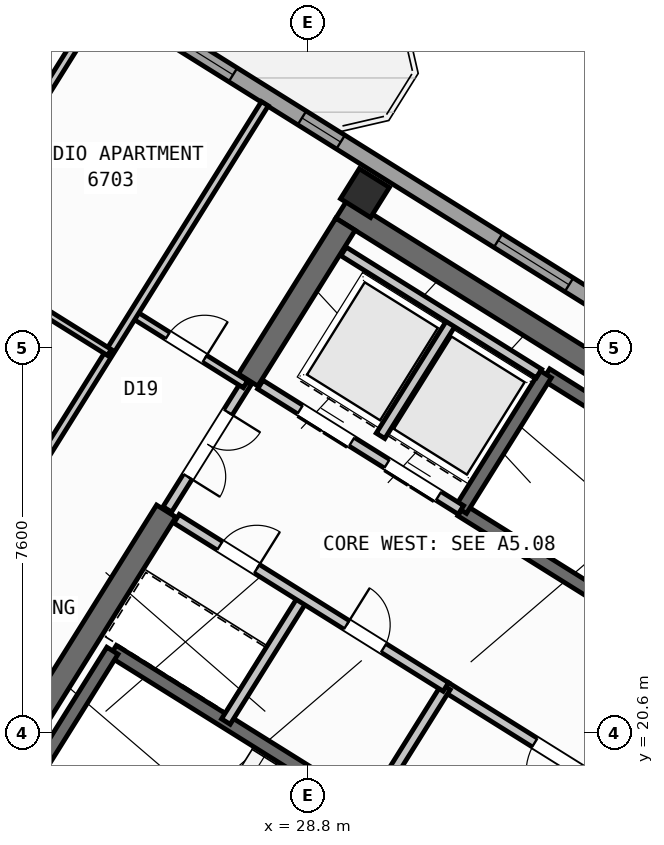
"""IFC4 building model, lengths in metres.
Left out: names, types, materials, properties, quantities, classifications, styles, units other than length and angle.
Written with IfcOpenShell. Run it as: python <this file> out.ifc"""

import sys

from ifc_helpers import new_model, si_unit, direction, frame, frame_2d, origin, origin_2d, place, context, subcontext, project, spatial, rectangle, hollow_rectangle, extrude, source, transform, mapped, element, fill, save


model = new_model("IFC4")
c1 = context("Model", 3, precision=1e-05, world=origin(), true_north=direction((0.0, 1.0)))
c2 = subcontext(c1, "Body", "Model", "MODEL_VIEW")
j1 = project(units=[si_unit("LENGTHUNIT", "METRE"), si_unit("PLANEANGLEUNIT", "RADIAN")], contexts=[c1])
p1 = place(None, origin())
s1 = spatial("IfcSite", under=j1, at=p1, CompositionType="ELEMENT")
p2 = place(p1, origin())
s2 = spatial("IfcBuilding", under=s1, at=p2, CompositionType="ELEMENT")
p3 = place(p2, frame((0.0, 0.0, 266.4)))
s3 = spatial("IfcBuildingStorey", under=s2, at=p3, CompositionType="ELEMENT", Elevation=266.4)
p4 = place(p3, frame((40.531, 24.036, 0.0), z_axis=(0.0, 0.0, 1.0), x_axis=(-0.848048787466, 0.529918157905, 0.0)))
e1 = element("IfcWall", 1, at=p4, inside=s3, PredefinedType="SHEAR", context=c2, shape_type="SweptSolid", body=[
    extrude(rectangle(XDim=13.04, YDim=0.45, at=frame_2d((6.52, 0.0))), origin(), (0.0, 0.0, 1.0), 3.35),
])
p5 = place(p3, frame((29.544, 30.636, 0.0), z_axis=(0.0, 0.0, 1.0), x_axis=(-0.529902075036, -0.848058836916, 0.0)))
e2 = element("IfcWall", 2, at=p5, inside=s3, PredefinedType="SHEAR", context=c2, shape_type="SweptSolid", body=[
    extrude(rectangle(XDim=3.625, YDim=0.45, at=frame_2d((1.812, 0.0))), origin(), (0.0, 0.0, 1.0), 3.35),
])
p6 = place(p3, frame((26.007, 24.976, 0.0), z_axis=(0.0, 0.0, 1.0), x_axis=(-0.529931155655, -0.848040665456, 0.0)))
e3 = element("IfcWall", 3, at=p6, inside=s3, PredefinedType="SHEAR", context=c2, shape_type="SweptSolid", body=[
    extrude(rectangle(XDim=6.475, YDim=0.45, at=frame_2d((3.238, 0.0))), origin(), (0.0, 0.0, 1.0), 3.35),
])
m1 = source(origin(), c2, "Body", "SweptSolid", [
    extrude(hollow_rectangle(XDim=0.7, YDim=0.7, WallThickness=0.028, at=origin_2d()), origin(), (0.0, 0.0, 1.0), 3.6),
])
p7 = place(p3, frame((29.928, 31.251, 0.0), z_axis=(0.0, 0.0, 1.0), x_axis=(-0.848048096156, 0.529919264233, 0.0)))
e4 = element("IfcColumn", 4, at=p7, inside=s3, PredefinedType="COLUMN", context=c2, shape_type="MappedRepresentation", body=[
    mapped(m1, transform((0.0, 0.0, 0.0), scale=1.0)),
])
p8 = place(p3, frame((29.268, 6.429, 0.0), z_axis=(0.0, 0.0, 1.0), x_axis=(-0.848049971435, 0.529916263149, 0.0)))
e5 = element("IfcWall", 5, at=p8, inside=s3, PredefinedType="STANDARD", context=c2, shape_type="SweptSolid", body=[
    extrude(rectangle(XDim=31.588, YDim=0.32, at=frame_2d((15.794, 0.0))), origin(), (0.0, 0.0, 1.0), 3.35),
])
p9 = place(p8, frame((16.362, 0.0, 0.0)))
e6 = element("IfcOpeningElement", 6, at=p9, cuts=e5, PredefinedType="OPENING", context=c2, shape_type="SweptSolid", body=[
    extrude(rectangle(XDim=1.2, YDim=2.15, at=frame_2d((0.6, 1.075))), frame((0.0, 0.17, 0.0), z_axis=(0.0, -1.0, 0.0), x_axis=(1.0, 0.0, 0.0)), (0.0, 0.0, 1.0), 0.34),
])
p10 = place(p8, frame((3.859, 0.0, 0.9)))
e7 = element("IfcOpeningElement", 7, at=p10, cuts=e5, PredefinedType="OPENING", context=c2, shape_type="SweptSolid", body=[
    extrude(rectangle(XDim=1.65, YDim=1.45, at=frame_2d((0.825, 0.725))), frame((0.0, 0.17, 0.0), z_axis=(0.0, -1.0, 0.0), x_axis=(1.0, 0.0, 0.0)), (0.0, 0.0, 1.0), 0.34),
])
p11 = place(p8, frame((10.519, 0.0, 0.9)))
e8 = element("IfcOpeningElement", 8, at=p11, cuts=e5, PredefinedType="OPENING", context=c2, shape_type="SweptSolid", body=[
    extrude(rectangle(XDim=1.65, YDim=1.45, at=frame_2d((0.825, 0.725))), frame((0.0, 0.17, 0.0), z_axis=(0.0, -1.0, 0.0), x_axis=(1.0, 0.0, 0.0)), (0.0, 0.0, 1.0), 0.34),
])
p12 = place(p8, frame((21.219, 0.0, 0.95)))
e9 = element("IfcOpeningElement", 9, at=p12, cuts=e5, PredefinedType="OPENING", context=c2, shape_type="SweptSolid", body=[
    extrude(rectangle(XDim=1.95, YDim=1.35, at=frame_2d((0.975, 0.675))), frame((0.0, 0.17, 0.0), z_axis=(0.0, -1.0, 0.0), x_axis=(1.0, 0.0, 0.0)), (0.0, 0.0, 1.0), 0.34),
])
p13 = place(p8, frame((26.406, 0.0, 1.0)))
e10 = element("IfcOpeningElement", 10, at=p13, cuts=e5, PredefinedType="OPENING", context=c2, shape_type="SweptSolid", body=[
    extrude(rectangle(XDim=0.9, YDim=1.25, at=frame_2d((0.45, 0.625))), frame((0.0, 0.17, 0.0), z_axis=(0.0, -1.0, 0.0), x_axis=(1.0, 0.0, 0.0)), (0.0, 0.0, 1.0), 0.34),
])
p14 = place(p8, frame((29.143, 0.0, 0.9)))
e11 = element("IfcOpeningElement", 11, at=p14, cuts=e5, PredefinedType="OPENING", context=c2, shape_type="SweptSolid", body=[
    extrude(rectangle(XDim=1.65, YDim=1.45, at=frame_2d((0.825, 0.725))), frame((0.0, 0.17, 0.0), z_axis=(0.0, -1.0, 0.0), x_axis=(1.0, 0.0, 0.0)), (0.0, 0.0, 1.0), 0.34),
])
p15 = place(p3, frame((14.138, 41.825, 0.0), z_axis=(0.0, 0.0, 1.0), x_axis=(0.848046498049, -0.529921821731, 0.0)))
e12 = element("IfcWall", 12, at=p15, inside=s3, PredefinedType="STANDARD", context=c2, shape_type="SweptSolid", body=[
    extrude(rectangle(XDim=31.588, YDim=0.32, at=frame_2d((15.794, 0.0))), origin(), (0.0, 0.0, 1.0), 3.35),
])
p16 = place(p15, frame((3.46, 0.0, 0.0)))
e13 = element("IfcOpeningElement", 13, at=p16, cuts=e12, PredefinedType="OPENING", context=c2, shape_type="SweptSolid", body=[
    extrude(rectangle(XDim=1.05, YDim=2.15, at=frame_2d((0.525, 1.075))), frame((0.0, 0.17, 0.0), z_axis=(0.0, -1.0, 0.0), x_axis=(1.0, 0.0, 0.0)), (0.0, 0.0, 1.0), 0.34),
])
p17 = place(p15, frame((0.831, 0.0, 1.0)))
e14 = element("IfcOpeningElement", 14, at=p17, cuts=e12, PredefinedType="OPENING", context=c2, shape_type="SweptSolid", body=[
    extrude(rectangle(XDim=0.9, YDim=1.25, at=frame_2d((0.45, 0.625))), frame((0.0, 0.17, 0.0), z_axis=(0.0, -1.0, 0.0), x_axis=(1.0, 0.0, 0.0)), (0.0, 0.0, 1.0), 0.34),
])
p18 = place(p15, frame((8.719, 0.0, 0.9)))
e15 = element("IfcOpeningElement", 15, at=p18, cuts=e12, PredefinedType="OPENING", context=c2, shape_type="SweptSolid", body=[
    extrude(rectangle(XDim=1.35, YDim=1.45, at=frame_2d((0.675, 0.725))), frame((0.0, 0.17, 0.0), z_axis=(0.0, -1.0, 0.0), x_axis=(1.0, 0.0, 0.0)), (0.0, 0.0, 1.0), 0.34),
])
p19 = place(p15, frame((13.599, 0.0, 0.95)))
e16 = element("IfcOpeningElement", 16, at=p19, cuts=e12, PredefinedType="OPENING", context=c2, shape_type="SweptSolid", body=[
    extrude(rectangle(XDim=1.95, YDim=1.35, at=frame_2d((0.975, 0.675))), frame((0.0, 0.17, 0.0), z_axis=(0.0, -1.0, 0.0), x_axis=(1.0, 0.0, 0.0)), (0.0, 0.0, 1.0), 0.34),
])
p20 = place(p15, frame((17.154, 0.0, 1.0)))
e17 = element("IfcOpeningElement", 17, at=p20, cuts=e12, PredefinedType="OPENING", context=c2, shape_type="SweptSolid", body=[
    extrude(rectangle(XDim=0.9, YDim=1.25, at=frame_2d((0.45, 0.625))), frame((0.0, 0.17, 0.0), z_axis=(0.0, -1.0, 0.0), x_axis=(1.0, 0.0, 0.0)), (0.0, 0.0, 1.0), 0.34),
])
p21 = place(p15, frame((21.719, 0.0, 0.9)))
e18 = element("IfcOpeningElement", 18, at=p21, cuts=e12, PredefinedType="OPENING", context=c2, shape_type="SweptSolid", body=[
    extrude(rectangle(XDim=1.65, YDim=1.45, at=frame_2d((0.825, 0.725))), frame((0.0, 0.17, 0.0), z_axis=(0.0, -1.0, 0.0), x_axis=(1.0, 0.0, 0.0)), (0.0, 0.0, 1.0), 0.34),
])
p22 = place(p15, frame((27.419, 0.0, 0.9)))
e19 = element("IfcOpeningElement", 19, at=p22, cuts=e12, PredefinedType="OPENING", context=c2, shape_type="SweptSolid", body=[
    extrude(rectangle(XDim=1.65, YDim=1.45, at=frame_2d((0.825, 0.725))), frame((0.0, 0.17, 0.0), z_axis=(0.0, -1.0, 0.0), x_axis=(1.0, 0.0, 0.0)), (0.0, 0.0, 1.0), 0.34),
])
p23 = place(p3, frame((31.28, 18.261, 0.0), z_axis=(0.0, 0.0, 1.0), x_axis=(-0.848051618787, 0.529913626805, 0.0)))
e20 = element("IfcWall", 20, at=p23, inside=s3, PredefinedType="SHEAR", context=c2, shape_type="SweptSolid", body=[
    extrude(rectangle(XDim=7.46, YDim=0.26, at=frame_2d((3.73, 0.0))), origin(), (0.0, 0.0, 1.0), 3.35),
])
p24 = place(p23, frame((0.36, 0.0, 0.0)))
e21 = element("IfcOpeningElement", 21, at=p24, cuts=e20, PredefinedType="OPENING", context=c2, shape_type="SweptSolid", body=[
    extrude(rectangle(XDim=0.86, YDim=2.05, at=frame_2d((0.43, 1.025))), frame((0.0, 0.14, 0.0), z_axis=(0.0, -1.0, 0.0), x_axis=(1.0, 0.0, 0.0)), (0.0, 0.0, 1.0), 0.28),
])
p25 = place(p3, frame((24.945, 22.22, 0.0), z_axis=(0.0, 0.0, 1.0), x_axis=(-0.529908658664, -0.84805472316, 0.0)))
e22 = element("IfcWall", 22, at=p25, inside=s3, PredefinedType="SHEAR", context=c2, shape_type="SweptSolid", body=[
    extrude(rectangle(XDim=3.16, YDim=0.26, at=frame_2d((1.58, 0.0))), origin(), (0.0, 0.0, 1.0), 3.35),
])
p26 = place(p3, frame((39.721, 23.788, 0.0), z_axis=(0.0, 0.0, 1.0), x_axis=(-0.848054434086, 0.529909121291, 0.0)))
e23 = element("IfcWall", 23, at=p26, inside=s3, PredefinedType="SHEAR", context=c2, shape_type="SweptSolid", body=[
    extrude(rectangle(XDim=7.33, YDim=0.26, at=frame_2d((3.665, 0.0))), origin(), (0.0, 0.0, 1.0), 3.35),
])
p27 = place(p3, frame((38.046, 21.108, 0.0), z_axis=(0.0, 0.0, 1.0), x_axis=(-0.848054434086, 0.529909121291, 0.0)))
e24 = element("IfcWall", 24, at=p27, inside=s3, PredefinedType="SHEAR", context=c2, shape_type="SweptSolid", body=[
    extrude(rectangle(XDim=7.33, YDim=0.26, at=frame_2d((3.665, 0.0))), origin(), (0.0, 0.0, 1.0), 3.35),
])
p28 = place(p27, frame((0.22, 0.0, 0.0)))
e25 = element("IfcOpeningElement", 25, at=p28, cuts=e24, PredefinedType="OPENING", context=c2, shape_type="SweptSolid", body=[
    extrude(rectangle(XDim=1.1, YDim=2.1, at=frame_2d((0.55, 1.05))), frame((0.0, 0.14, 0.0), z_axis=(0.0, -1.0, 0.0), x_axis=(1.0, 0.0, 0.0)), (0.0, 0.0, 1.0), 0.28),
])
p29 = place(p3, frame((33.496, 27.677, 0.0), z_axis=(0.0, 0.0, 1.0), x_axis=(-0.529908658664, -0.84805472316, 0.0)))
e26 = element("IfcWall", 26, at=p29, inside=s3, PredefinedType="SHEAR", context=c2, shape_type="SweptSolid", body=[
    extrude(rectangle(XDim=3.16, YDim=0.26, at=frame_2d((1.58, 0.0))), origin(), (0.0, 0.0, 1.0), 3.35),
])
p30 = place(p3, frame((36.459, 18.421, 0.0), z_axis=(0.0, 0.0, 1.0), x_axis=(-0.848059591691, 0.529900867089, 0.0)))
e27 = element("IfcWall", 27, at=p30, inside=s3, PredefinedType="STANDARD", context=c2, shape_type="SweptSolid", body=[
    extrude(rectangle(XDim=5.818, YDim=0.2, at=frame_2d((2.909, 0.0))), origin(), (0.0, 0.0, 1.0), 3.34),
])
p31 = place(p30, frame((2.598, 0.0, 0.0)))
e28 = element("IfcOpeningElement", 28, at=p31, cuts=e27, PredefinedType="OPENING", context=c2, shape_type="SweptSolid", body=[
    extrude(rectangle(XDim=1.15, YDim=2.1, at=frame_2d((0.575, 1.05))), frame((0.0, 0.11, 0.0), z_axis=(0.0, -1.0, 0.0), x_axis=(1.0, 0.0, 0.0)), (0.0, 0.0, 1.0), 0.22),
])
p32 = place(p3, frame((31.822, 24.998, 0.0), z_axis=(0.0, 0.0, 1.0), x_axis=(-0.848054125777, 0.529909614701, 0.0)))
e29 = element("IfcWall", 29, at=p32, inside=s3, PredefinedType="STANDARD", context=c2, shape_type="SweptSolid", body=[
    extrude(rectangle(XDim=4.668, YDim=0.2, at=frame_2d((2.334, 0.0))), origin(), (0.0, 0.0, 1.0), 3.34),
])
p33 = place(p32, frame((0.52, 0.0, 0.0)))
e30 = element("IfcOpeningElement", 30, at=p33, cuts=e29, PredefinedType="OPENING", context=c2, shape_type="SweptSolid", body=[
    extrude(rectangle(XDim=1.2, YDim=2.15, at=frame_2d((0.6, 1.075))), frame((0.0, 0.11, 0.0), z_axis=(0.0, -1.0, 0.0), x_axis=(1.0, 0.0, 0.0)), (0.0, 0.0, 1.0), 0.22),
])
p34 = place(p32, frame((2.54, 0.0, 0.0)))
e31 = element("IfcOpeningElement", 31, at=p34, cuts=e29, PredefinedType="OPENING", context=c2, shape_type="SweptSolid", body=[
    extrude(rectangle(XDim=1.2, YDim=2.15, at=frame_2d((0.6, 1.075))), frame((0.0, 0.11, 0.0), z_axis=(0.0, -1.0, 0.0), x_axis=(1.0, 0.0, 0.0)), (0.0, 0.0, 1.0), 0.22),
])
p35 = place(p3, frame((31.645, 28.716, 0.0), z_axis=(0.0, 0.0, 1.0), x_axis=(-0.52986693015, -0.848080795876, 0.0)))
e32 = element("IfcWall", 32, at=p35, inside=s3, PredefinedType="STANDARD", context=c2, shape_type="SweptSolid", body=[
    extrude(rectangle(XDim=2.66, YDim=0.2, at=frame_2d((1.33, 0.0))), origin(), (0.0, 0.0, 1.0), 3.34),
])
p36 = place(p3, frame((33.363, 27.69, 0.0), z_axis=(0.0, 0.0, 1.0), x_axis=(-0.84804957148, 0.529916903215, 0.0)))
e33 = element("IfcWall", 33, at=p36, inside=s3, PredefinedType="STANDARD", context=c2, shape_type="SweptSolid", body=[
    extrude(rectangle(XDim=4.548, YDim=0.2, at=frame_2d((2.274, 0.0))), origin(), (0.0, 0.0, 1.0), 3.34),
])
for number, where, z_axis, x_axis in (
    (34, (31.525, 21.504, 0.0), (0.0, 0.0, 1.0), (-0.53, -0.848, 0.0)),
    (35, (28.71, 23.263, 0.0), (0.0, 0.0, 1.0), (-0.53, -0.848, 0.0)),
):
    element("IfcWall", number, at=place(p3, frame(where, z_axis=z_axis, x_axis=x_axis)), inside=s3, PredefinedType="STANDARD", context=c2, shape_type="SweptSolid", body=[
        extrude(rectangle(XDim=2.88, YDim=0.2, at=frame_2d((1.44, 0.0))), origin(), (0.0, 0.0, 1.0), 3.34),
    ])
p37 = place(p3, frame((31.525, 21.504, 0.0), z_axis=(0.0, 0.0, 1.0), x_axis=(-0.848042066329, 0.529928913853, 0.0)))
e36 = element("IfcWall", 36, at=p37, inside=s3, PredefinedType="STANDARD", context=c2, shape_type="SweptSolid", body=[
    extrude(rectangle(XDim=6.268, YDim=0.2, at=frame_2d((3.134, 0.0))), origin(), (0.0, 0.0, 1.0), 3.34),
])
p38 = place(p37, frame((4.4, 0.0, 0.0)))
e37 = element("IfcOpeningElement", 37, at=p38, cuts=e36, PredefinedType="OPENING", context=c2, shape_type="SweptSolid", body=[
    extrude(rectangle(XDim=0.86, YDim=2.05, at=frame_2d((0.43, 1.025))), frame((0.0, 0.11, 0.0), z_axis=(0.0, -1.0, 0.0), x_axis=(1.0, 0.0, 0.0)), (0.0, 0.0, 1.0), 0.22),
])
p39 = place(p37, frame((1.45, 0.0, 0.0)))
e38 = element("IfcOpeningElement", 38, at=p39, cuts=e36, PredefinedType="OPENING", context=c2, shape_type="SweptSolid", body=[
    extrude(rectangle(XDim=0.86, YDim=2.05, at=frame_2d((0.43, 1.025))), frame((0.0, 0.11, 0.0), z_axis=(0.0, -1.0, 0.0), x_axis=(1.0, 0.0, 0.0)), (0.0, 0.0, 1.0), 0.22),
])
p40 = place(p3, frame((27.596, 27.52, 0.0), z_axis=(0.0, 0.0, 1.0), x_axis=(-0.529865479138, -0.848081702443, 0.0)))
e39 = element("IfcWall", 39, at=p40, inside=s3, PredefinedType="STANDARD", context=c2, shape_type="SweptSolid", body=[
    extrude(rectangle(XDim=2.96, YDim=0.2, at=frame_2d((1.48, 0.0))), origin(), (0.0, 0.0, 1.0), 3.34),
])
p41 = place(p40, frame((0.7, 0.0, 0.0)))
e40 = element("IfcOpeningElement", 40, at=p41, cuts=e39, PredefinedType="OPENING", context=c2, shape_type="SweptSolid", body=[
    extrude(rectangle(XDim=1.5, YDim=2.15, at=frame_2d((0.75, 1.075))), frame((0.0, 0.11, 0.0), z_axis=(0.0, -1.0, 0.0), x_axis=(1.0, 0.0, 0.0)), (0.0, 0.0, 1.0), 0.22),
])
p42 = place(p3, frame((27.57, 27.478, 0.0), z_axis=(0.0, 0.0, 1.0), x_axis=(-0.848050851465, 0.529914854792, 0.0)))
e41 = element("IfcWall", 41, at=p42, inside=s3, PredefinedType="PARTITIONING", context=c2, shape_type="SweptSolid", body=[
    extrude(rectangle(XDim=2.61, YDim=0.16, at=frame_2d((1.305, 0.0))), origin(), (0.0, 0.0, 1.0), 3.34),
])
p43 = place(p42, frame((0.95, 0.0, 0.0)))
e42 = element("IfcOpeningElement", 42, at=p43, cuts=e41, PredefinedType="OPENING", context=c2, shape_type="SweptSolid", body=[
    extrude(rectangle(XDim=0.86, YDim=2.05, at=frame_2d((0.43, 1.025))), frame((0.0, 0.09, 0.0), z_axis=(0.0, -1.0, 0.0), x_axis=(1.0, 0.0, 0.0)), (0.0, 0.0, 1.0), 0.18),
])
p44 = place(p3, frame((27.953, 33.016, 0.0), z_axis=(0.0, 0.0, 1.0), x_axis=(-0.529909450694, -0.848054228257, 0.0)))
e43 = element("IfcWall", 43, at=p44, inside=s3, PredefinedType="PARTITIONING", context=c2, shape_type="SweptSolid", body=[
    extrude(rectangle(XDim=10.3, YDim=0.16, at=frame_2d((5.15, 0.0))), origin(), (0.0, 0.0, 1.0), 3.34),
])
p45 = place(p3, frame((24.309, 34.336, 0.0), z_axis=(0.0, 0.0, 1.0), x_axis=(-0.529895484599, -0.848062954858, 0.0)))
e44 = element("IfcWall", 44, at=p45, inside=s3, PredefinedType="PARTITIONING", context=c2, shape_type="SweptSolid", body=[
    extrude(rectangle(XDim=6.576, YDim=0.16, at=frame_2d((3.288, 0.0))), origin(), (0.0, 0.0, 1.0), 2.875),
])
p46 = place(p3, frame((24.885, 28.106, 0.0), z_axis=(0.0, 0.0, 1.0), x_axis=(-0.848059820872, 0.529900500304, 0.0)))
e45 = element("IfcWall", 45, at=p46, inside=s3, PredefinedType="PLUMBINGWALL", context=c2, shape_type="SweptSolid", body=[
    extrude(rectangle(XDim=3.79, YDim=0.14, at=frame_2d((1.895, 0.0))), origin(), (0.0, 0.0, 1.0), 3.34),
])
p47 = place(p46, frame((2.23, 0.0, 0.0)))
e46 = element("IfcOpeningElement", 46, at=p47, cuts=e45, PredefinedType="OPENING", context=c2, shape_type="SweptSolid", body=[
    extrude(rectangle(XDim=0.92, YDim=2.08, at=frame_2d((0.46, 1.04))), frame((0.0, 0.08, 0.0), z_axis=(0.0, -1.0, 0.0), x_axis=(1.0, 0.0, 0.0)), (0.0, 0.0, 1.0), 0.16),
])
m2 = source(origin(), c2, "Body", "SweptSolid", [
    extrude(rectangle(XDim=1.95, YDim=1.35, at=frame_2d((0.975, 0.675))), frame((0.0, 0.03, 0.0), z_axis=(0.0, -1.0, 0.0), x_axis=(1.0, 0.0, 0.0)), (0.0, 0.0, 1.0), 0.06),
])
p48 = place(p19, origin())
e47 = element("IfcWindow", 47, at=p48, inside=s3, PartitioningType="SINGLE_PANEL", PredefinedType="WINDOW", context=c2, shape_type="MappedRepresentation", body=[
    mapped(m2, transform((0.0, 0.0, 0.0), scale=1.0)),
])
fill(e16, e47)
m3 = source(origin(), c2, "Body", "SweptSolid", [
    extrude(rectangle(XDim=0.9, YDim=1.25, at=frame_2d((0.45, 0.625))), frame((0.0, 0.03, 0.0), z_axis=(0.0, -1.0, 0.0), x_axis=(1.0, 0.0, 0.0)), (0.0, 0.0, 1.0), 0.06),
])
p49 = place(p20, origin())
e48 = element("IfcWindow", 48, at=p49, inside=s3, PartitioningType="SINGLE_PANEL", PredefinedType="WINDOW", context=c2, shape_type="MappedRepresentation", body=[
    mapped(m3, transform((0.0, 0.0, 0.0), scale=1.0)),
])
fill(e17, e48)
m4 = source(origin(), c2, "Body", "SweptSolid", [
    extrude(rectangle(XDim=1.65, YDim=1.45, at=frame_2d((0.825, 0.725))), frame((0.0, 0.03, 0.0), z_axis=(0.0, -1.0, 0.0), x_axis=(1.0, 0.0, 0.0)), (0.0, 0.0, 1.0), 0.06),
])
p50 = place(p21, origin())
e49 = element("IfcWindow", 49, at=p50, inside=s3, PartitioningType="SINGLE_PANEL", PredefinedType="WINDOW", context=c2, shape_type="MappedRepresentation", body=[
    mapped(m4, transform((0.0, 0.0, 0.0), scale=1.0)),
])
fill(e18, e49)
m5 = source(origin(), c2, "Body", "SweptSolid", [
    extrude(rectangle(XDim=1.15, YDim=2.1, at=frame_2d((0.575, 1.05))), frame((0.0, 0.025, 0.0), z_axis=(0.0, -1.0, 0.0), x_axis=(1.0, 0.0, 0.0)), (0.0, 0.0, 1.0), 0.05),
])
p51 = place(p31, origin())
e50 = element("IfcDoor", 50, at=p51, inside=s3, OperationType="SINGLE_SWING_LEFT", PredefinedType="DOOR", context=c2, shape_type="MappedRepresentation", body=[
    mapped(m5, transform((0.0, 0.0, 0.0), scale=1.0)),
])
fill(e28, e50)
m6 = source(origin(), c2, "Body", "SweptSolid", [
    extrude(rectangle(XDim=1.2, YDim=2.15, at=frame_2d((0.6, 1.075))), frame((0.0, 0.025, 0.0), z_axis=(0.0, -1.0, 0.0), x_axis=(1.0, 0.0, 0.0)), (0.0, 0.0, 1.0), 0.05),
])
p52 = place(p33, origin())
e51 = element("IfcDoor", 51, at=p52, inside=s3, OperationType="DOUBLE_DOOR_SLIDING", PredefinedType="DOOR", context=c2, shape_type="MappedRepresentation", body=[
    mapped(m6, transform((0.0, 0.0, 0.0), scale=1.0)),
])
fill(e30, e51)
p53 = place(p34, origin())
e52 = element("IfcDoor", 52, at=p53, inside=s3, OperationType="DOUBLE_DOOR_SLIDING", PredefinedType="DOOR", context=c2, shape_type="MappedRepresentation", body=[
    mapped(m6, transform((0.0, 0.0, 0.0), scale=1.0)),
])
fill(e31, e52)
m7 = source(origin(), c2, "Body", "SweptSolid", [
    extrude(rectangle(XDim=0.86, YDim=2.05, at=frame_2d((0.43, 1.025))), frame((0.0, 0.025, 0.0), z_axis=(0.0, -1.0, 0.0), x_axis=(1.0, 0.0, 0.0)), (0.0, 0.0, 1.0), 0.05),
])
p54 = place(p38, frame((0.86, 0.0, 0.0), z_axis=(0.0, 0.0, 1.0), x_axis=(-1.0, 0.0, 0.0)))
e53 = element("IfcDoor", 53, at=p54, inside=s3, OperationType="SINGLE_SWING_RIGHT", PredefinedType="DOOR", context=c2, shape_type="MappedRepresentation", body=[
    mapped(m7, transform((0.0, 0.0, 0.0), scale=1.0)),
])
fill(e37, e53)
p55 = place(p39, frame((0.86, 0.0, 0.0), z_axis=(0.0, 0.0, 1.0), x_axis=(-1.0, 0.0, 0.0)))
e54 = element("IfcDoor", 54, at=p55, inside=s3, OperationType="SINGLE_SWING_LEFT", PredefinedType="DOOR", context=c2, shape_type="MappedRepresentation", body=[
    mapped(m7, transform((0.0, 0.0, 0.0), scale=1.0)),
])
fill(e38, e54)
p56 = place(p43, frame((0.86, 0.0, 0.0), z_axis=(0.0, 0.0, 1.0), x_axis=(-1.0, 0.0, 0.0)))
e55 = element("IfcDoor", 55, at=p56, inside=s3, OperationType="SINGLE_SWING_RIGHT", PredefinedType="DOOR", context=c2, shape_type="MappedRepresentation", body=[
    mapped(m7, transform((0.0, 0.0, 0.0), scale=1.0)),
])
fill(e42, e55)
m8 = source(origin(), c2, "Body", "SweptSolid", [
    extrude(rectangle(XDim=1.5, YDim=2.15, at=frame_2d((0.75, 1.075))), frame((0.0, 0.025, 0.0), z_axis=(0.0, -1.0, 0.0), x_axis=(1.0, 0.0, 0.0)), (0.0, 0.0, 1.0), 0.05),
])
p57 = place(p41, origin())
e56 = element("IfcDoor", 56, at=p57, inside=s3, OperationType="DOUBLE_DOOR_SINGLE_SWING", PredefinedType="DOOR", context=c2, shape_type="MappedRepresentation", body=[
    mapped(m8, transform((0.0, 0.0, 0.0), scale=1.0)),
])
fill(e40, e56)
save(model, sys.argv[1])
